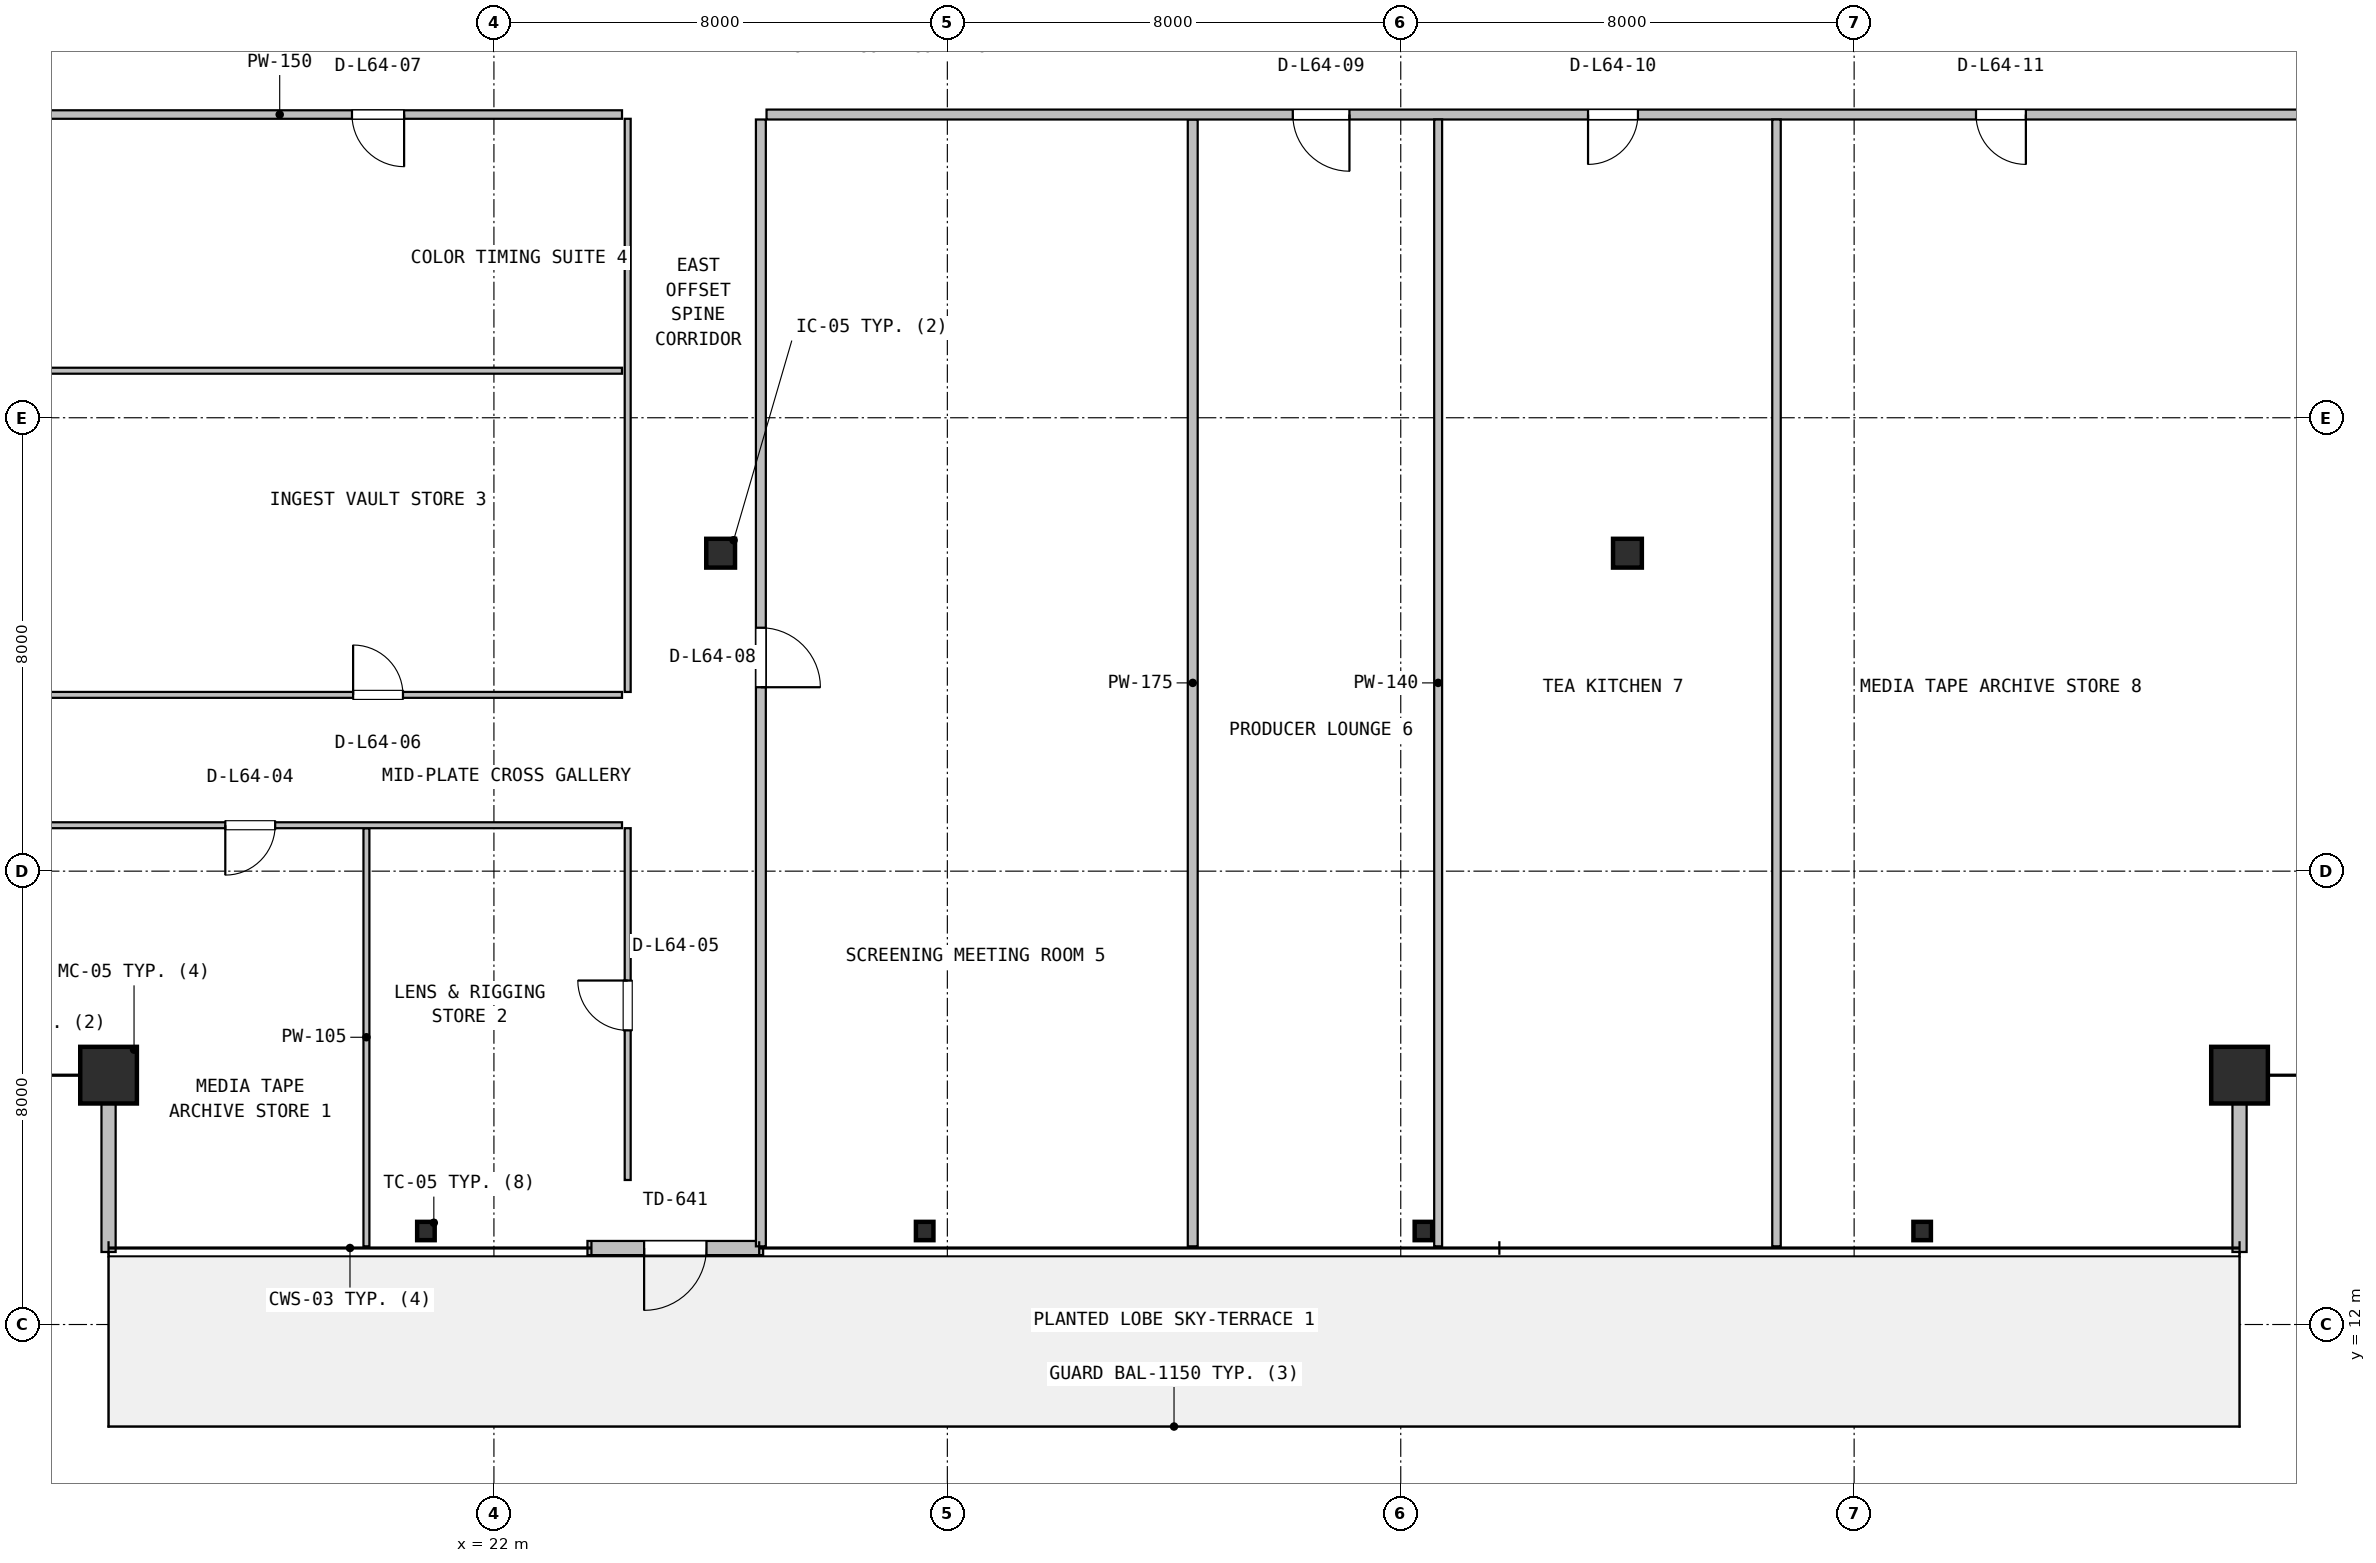
"""IFC4 building model, lengths in metres.
Left out: names, types, materials, properties, quantities, classifications, styles, units other than length and angle.
Written with IfcOpenShell. Run it as: python <this file> out.ifc"""

import sys

from ifc_helpers import new_model, si_unit, direction, frame, frame_2d, origin, origin_2d, place, context, subcontext, project, spatial, rectangle, hollow_rectangle, hollow_circle, i_section, extrude, source, transform, mapped, element, fill, save


model = new_model("IFC4")
c1 = context("Model", 3, precision=1e-05, world=origin(), true_north=direction((0.0, 1.0)))
c2 = subcontext(c1, "Body", "Model", "MODEL_VIEW")
j1 = project(units=[si_unit("LENGTHUNIT", "METRE"), si_unit("PLANEANGLEUNIT", "RADIAN")], contexts=[c1])
p1 = place(None, origin())
s1 = spatial("IfcSite", under=j1, at=p1, CompositionType="ELEMENT")
p2 = place(p1, origin())
s2 = spatial("IfcBuilding", under=s1, at=p2, CompositionType="ELEMENT")
p3 = place(p2, frame((0.0, 0.0, 258.4)))
s3 = spatial("IfcBuildingStorey", under=s2, at=p3, CompositionType="ELEMENT", Elevation=258.4)
m1 = source(origin(), c2, "Body", "SweptSolid", [
    extrude(hollow_rectangle(XDim=1.0, YDim=1.0, WallThickness=0.04, at=origin_2d()), origin(), (0.0, 0.0, 1.0), 3.8),
])
for number, where, z_axis, x_axis in (
    (1, (15.2, 16.4, 0.0), (0.0, 0.0, 1.0), (1.0, 0.0, 0.0)),
    (2, (52.8, 16.4, 0.0), (0.0, 0.0, 1.0), (1.0, 0.0, 0.0)),
):
    element("IfcColumn", number, at=place(p3, frame(where, z_axis=z_axis, x_axis=x_axis)), inside=s3, PredefinedType="COLUMN", context=c2, shape_type="MappedRepresentation", body=[
        mapped(m1, transform((0.0, 0.0, 0.0), x_axis=(1.0, 0.0, 0.0), y_axis=(0.0, 1.0, 0.0), z_axis=(0.0, 0.0, 1.0), scale=1.0)),
    ])
m2 = source(origin(), c2, "Body", "SweptSolid", [
    extrude(i_section(OverallWidth=0.309, OverallDepth=0.323, WebThickness=0.014, FlangeThickness=0.023, FilletRadius=0.015, at=origin_2d()), origin(), (0.0, 0.0, 1.0), 3.8),
])
for number, where, z_axis, x_axis in (
    (3, (20.8, 13.65, 0.0), (0.0, 0.0, 1.0), (1.0, 0.0, 0.0)),
    (4, (29.6, 13.65, 0.0), (0.0, 0.0, 1.0), (1.0, 0.0, 0.0)),
    (5, (38.4, 13.65, 0.0), (0.0, 0.0, 1.0), (1.0, 0.0, 0.0)),
    (6, (47.2, 13.65, 0.0), (0.0, 0.0, 1.0), (1.0, 0.0, 0.0)),
):
    element("IfcColumn", number, at=place(p3, frame(where, z_axis=z_axis, x_axis=x_axis)), inside=s3, PredefinedType="COLUMN", context=c2, shape_type="MappedRepresentation", body=[
        mapped(m2, transform((0.0, 0.0, 0.0), x_axis=(1.0, 0.0, 0.0), y_axis=(0.0, 1.0, 0.0), z_axis=(0.0, 0.0, 1.0), scale=1.0)),
    ])
m3 = source(origin(), c2, "Body", "SweptSolid", [
    extrude(hollow_circle(Radius=0.254, WallThickness=0.02, at=origin_2d()), origin(), (0.0, 0.0, 1.0), 3.8),
])
for number, where, z_axis, x_axis in (
    (7, (26.0, 25.61, 0.0), (0.0, 0.0, 1.0), (1.0, 0.0, 0.0)),
    (8, (42.0, 25.61, 0.0), (0.0, 0.0, 1.0), (1.0, 0.0, 0.0)),
):
    element("IfcColumn", number, at=place(p3, frame(where, z_axis=z_axis, x_axis=x_axis)), inside=s3, PredefinedType="COLUMN", context=c2, shape_type="MappedRepresentation", body=[
        mapped(m3, transform((0.0, 0.0, 0.0), x_axis=(1.0, 0.0, 0.0), y_axis=(0.0, 1.0, 0.0), z_axis=(0.0, 0.0, 1.0), scale=1.0)),
    ])
p4 = place(p3, frame((23.65, 13.35, 0.0), z_axis=(0.0, 0.0, 1.0), x_axis=(1.0, 0.0, 0.0)))
e9 = element("IfcWall", 9, at=p4, inside=s3, PredefinedType="SOLIDWALL", context=c2, shape_type="SweptSolid", body=[
    extrude(rectangle(XDim=3.1, YDim=0.25, at=frame_2d((1.55, 0.0))), origin(), (0.0, 0.0, 1.0), 3.53),
])
p5 = place(p4, frame((1.0, 0.0, 0.0)))
e10 = element("IfcOpeningElement", 10, at=p5, cuts=e9, PredefinedType="OPENING", context=c2, shape_type="SweptSolid", body=[
    extrude(rectangle(XDim=1.1, YDim=2.15, at=frame_2d((0.55, 1.075))), frame((0.0, 0.135, 0.0), z_axis=(0.0, -1.0, 0.0), x_axis=(1.0, 0.0, 0.0)), (0.0, 0.0, 1.0), 0.27),
])
for number, where, z_axis, x_axis in (
    (11, (15.2, 13.28, 0.0), (0.0, 0.0, 1.0), (0.0, 1.0, 0.0)),
    (12, (52.8, 13.28, 0.0), (0.0, 0.0, 1.0), (0.0, 1.0, 0.0)),
):
    element("IfcWall", number, at=place(p3, frame(where, z_axis=z_axis, x_axis=x_axis)), inside=s3, PredefinedType="SOLIDWALL", context=c2, shape_type="SweptSolid", body=[
        extrude(rectangle(XDim=3.2, YDim=0.25, at=frame_2d((1.6, 0.0))), origin(), (0.0, 0.0, 1.0), 3.171),
    ])
p6 = place(p3, frame((19.75, 13.38, 0.0), z_axis=(0.0, 0.0, 1.0), x_axis=(0.0, 1.0, 0.0)))
e13 = element("IfcWall", 13, at=p6, inside=s3, PredefinedType="PARTITIONING", context=c2, shape_type="SweptSolid", body=[
    extrude(rectangle(XDim=7.378, YDim=0.105, at=frame_2d((3.689, 0.0))), origin(), (0.0, 0.0, 1.0), 3.171),
])
p7 = place(p3, frame((12.18, 20.81, 0.0), z_axis=(0.0, 0.0, 1.0), x_axis=(1.0, 0.0, 0.0)))
e14 = element("IfcWall", 14, at=p7, inside=s3, PredefinedType="PARTITIONING", context=c2, shape_type="SweptSolid", body=[
    extrude(rectangle(XDim=12.08, YDim=0.105, at=frame_2d((6.04, 0.0))), origin(), (0.0, 0.0, 1.0), 3.171),
])
p8 = place(p7, frame((5.08, 0.0, 0.0)))
e15 = element("IfcOpeningElement", 15, at=p8, cuts=e14, PredefinedType="OPENING", context=c2, shape_type="SweptSolid", body=[
    extrude(rectangle(XDim=0.88, YDim=2.06, at=frame_2d((0.44, 1.03))), frame((0.0, 0.062, 0.0), z_axis=(0.0, -1.0, 0.0), x_axis=(1.0, 0.0, 0.0)), (0.0, 0.0, 1.0), 0.125),
])
p9 = place(p3, frame((24.36, 14.55, 0.0), z_axis=(0.0, 0.0, 1.0), x_axis=(0.0, 1.0, 0.0)))
e16 = element("IfcWall", 16, at=p9, inside=s3, PredefinedType="PARTITIONING", context=c2, shape_type="SweptSolid", body=[
    extrude(rectangle(XDim=6.208, YDim=0.105, at=frame_2d((3.104, 0.0))), origin(), (0.0, 0.0, 1.0), 3.278),
])
p10 = place(p9, frame((2.64, 0.0, 0.0)))
e17 = element("IfcOpeningElement", 17, at=p10, cuts=e16, PredefinedType="OPENING", context=c2, shape_type="SweptSolid", body=[
    extrude(rectangle(XDim=0.88, YDim=2.06, at=frame_2d((0.44, 1.03))), frame((0.0, 0.062, 0.0), z_axis=(0.0, -1.0, 0.0), x_axis=(1.0, 0.0, 0.0)), (0.0, 0.0, 1.0), 0.125),
])
p11 = place(p3, frame((12.18, 23.11, 0.0), z_axis=(0.0, 0.0, 1.0), x_axis=(1.0, 0.0, 0.0)))
e18 = element("IfcWall", 18, at=p11, inside=s3, PredefinedType="PARTITIONING", context=c2, shape_type="SweptSolid", body=[
    extrude(rectangle(XDim=12.08, YDim=0.105, at=frame_2d((6.04, 0.0))), origin(), (0.0, 0.0, 1.0), 3.171),
])
p12 = place(p11, frame((7.335, 0.0, 0.0)))
e19 = element("IfcOpeningElement", 19, at=p12, cuts=e18, PredefinedType="OPENING", context=c2, shape_type="SweptSolid", body=[
    extrude(rectangle(XDim=0.88, YDim=2.06, at=frame_2d((0.44, 1.03))), frame((0.0, 0.062, 0.0), z_axis=(0.0, -1.0, 0.0), x_axis=(1.0, 0.0, 0.0)), (0.0, 0.0, 1.0), 0.125),
])
p13 = place(p3, frame((24.36, 23.162, 0.0), z_axis=(0.0, 0.0, 1.0), x_axis=(0.0, 1.0, 0.0)))
e20 = element("IfcWall", 20, at=p13, inside=s3, PredefinedType="PARTITIONING", context=c2, shape_type="SweptSolid", body=[
    extrude(rectangle(XDim=10.113, YDim=0.105, at=frame_2d((5.056, 0.0))), origin(), (0.0, 0.0, 1.0), 3.278),
])
p14 = place(p3, frame((12.18, 28.83, 0.0), z_axis=(0.0, 0.0, 1.0), x_axis=(1.0, 0.0, 0.0)))
e21 = element("IfcWall", 21, at=p14, inside=s3, PredefinedType="PARTITIONING", context=c2, shape_type="SweptSolid", body=[
    extrude(rectangle(XDim=12.08, YDim=0.105, at=frame_2d((6.04, 0.0))), origin(), (0.0, 0.0, 1.0), 3.171),
])
p15 = place(p3, frame((12.18, 33.35, 0.0), z_axis=(0.0, 0.0, 1.0), x_axis=(1.0, 0.0, 0.0)))
e22 = element("IfcWall", 22, at=p15, inside=s3, PredefinedType="PARTITIONING", context=c2, shape_type="SweptSolid", body=[
    extrude(rectangle(XDim=12.08, YDim=0.15, at=frame_2d((6.04, 0.0))), origin(), (0.0, 0.0, 1.0), 3.171),
])
p16 = place(p15, frame((7.315, 0.0, 0.0)))
e23 = element("IfcOpeningElement", 23, at=p16, cuts=e22, PredefinedType="OPENING", context=c2, shape_type="SweptSolid", body=[
    extrude(rectangle(XDim=0.92, YDim=2.08, at=frame_2d((0.46, 1.04))), frame((0.0, 0.085, 0.0), z_axis=(0.0, -1.0, 0.0), x_axis=(1.0, 0.0, 0.0)), (0.0, 0.0, 1.0), 0.17),
])
p17 = place(p3, frame((34.33, 13.38, 0.0), z_axis=(0.0, 0.0, 1.0), x_axis=(0.0, 1.0, 0.0)))
e24 = element("IfcWall", 24, at=p17, inside=s3, PredefinedType="PARTITIONING", context=c2, shape_type="SweptSolid", body=[
    extrude(rectangle(XDim=19.883, YDim=0.175, at=frame_2d((9.941, 0.0))), origin(), (0.0, 0.0, 1.0), 2.981),
])
p18 = place(p3, frame((26.81, 33.35, 0.0), z_axis=(0.0, 0.0, 1.0), x_axis=(1.0, 0.0, 0.0)))
e25 = element("IfcWall", 25, at=p18, inside=s3, PredefinedType="PARTITIONING", context=c2, shape_type="SweptSolid", body=[
    extrude(rectangle(XDim=29.01, YDim=0.175, at=frame_2d((14.505, 0.0))), origin(), (0.0, 0.0, 1.0), 2.981),
])
p19 = place(p18, frame((9.285, 0.0, 0.0)))
e26 = element("IfcOpeningElement", 26, at=p19, cuts=e25, PredefinedType="OPENING", context=c2, shape_type="SweptSolid", body=[
    extrude(rectangle(XDim=1.0, YDim=2.1, at=frame_2d((0.5, 1.05))), frame((0.0, 0.098, 0.0), z_axis=(0.0, -1.0, 0.0), x_axis=(1.0, 0.0, 0.0)), (0.0, 0.0, 1.0), 0.195),
])
p20 = place(p18, frame((14.495, 0.0, 0.0)))
e27 = element("IfcOpeningElement", 27, at=p20, cuts=e25, PredefinedType="OPENING", context=c2, shape_type="SweptSolid", body=[
    extrude(rectangle(XDim=0.88, YDim=2.06, at=frame_2d((0.44, 1.03))), frame((0.0, 0.098, 0.0), z_axis=(0.0, -1.0, 0.0), x_axis=(1.0, 0.0, 0.0)), (0.0, 0.0, 1.0), 0.195),
])
p21 = place(p18, frame((21.34, 0.0, 0.0)))
e28 = element("IfcOpeningElement", 28, at=p21, cuts=e25, PredefinedType="OPENING", context=c2, shape_type="SweptSolid", body=[
    extrude(rectangle(XDim=0.88, YDim=2.06, at=frame_2d((0.44, 1.03))), frame((0.0, 0.098, 0.0), z_axis=(0.0, -1.0, 0.0), x_axis=(1.0, 0.0, 0.0)), (0.0, 0.0, 1.0), 0.195),
])
p22 = place(p3, frame((26.71, 13.38, 0.0), z_axis=(0.0, 0.0, 1.0), x_axis=(0.0, 1.0, 0.0)))
e29 = element("IfcWall", 29, at=p22, inside=s3, PredefinedType="PARTITIONING", context=c2, shape_type="SweptSolid", body=[
    extrude(rectangle(XDim=19.883, YDim=0.175, at=frame_2d((9.941, 0.0))), origin(), (0.0, 0.0, 1.0), 2.981),
])
p23 = place(p22, frame((9.865, 0.0, 0.0)))
e30 = element("IfcOpeningElement", 30, at=p23, cuts=e29, PredefinedType="OPENING", context=c2, shape_type="SweptSolid", body=[
    extrude(rectangle(XDim=1.05, YDim=2.1, at=frame_2d((0.525, 1.05))), frame((0.0, 0.098, 0.0), z_axis=(0.0, -1.0, 0.0), x_axis=(1.0, 0.0, 0.0)), (0.0, 0.0, 1.0), 0.195),
])
p24 = place(p3, frame((38.66, 13.38, 0.0), z_axis=(0.0, 0.0, 1.0), x_axis=(0.0, 1.0, 0.0)))
e31 = element("IfcWall", 31, at=p24, inside=s3, PredefinedType="PARTITIONING", context=c2, shape_type="SweptSolid", body=[
    extrude(rectangle(XDim=19.883, YDim=0.14, at=frame_2d((9.941, 0.0))), origin(), (0.0, 0.0, 1.0), 2.981),
])
p25 = place(p3, frame((44.63, 13.38, 0.0), z_axis=(0.0, 0.0, 1.0), x_axis=(0.0, 1.0, 0.0)))
e32 = element("IfcWall", 32, at=p25, inside=s3, PredefinedType="PARTITIONING", context=c2, shape_type="SweptSolid", body=[
    extrude(rectangle(XDim=19.883, YDim=0.15, at=frame_2d((9.941, 0.0))), origin(), (0.0, 0.0, 1.0), 3.171),
])
m4 = source(origin(), c2, "Body", "SweptSolid", [
    extrude(rectangle(XDim=1.1, YDim=2.15, at=frame_2d((0.55, 1.075))), frame((0.0, 0.025, 0.0), z_axis=(0.0, -1.0, 0.0), x_axis=(1.0, 0.0, 0.0)), (0.0, 0.0, 1.0), 0.05),
])
p26 = place(p5, frame((1.1, 0.0, 0.0), z_axis=(0.0, 0.0, 1.0), x_axis=(-1.0, 0.0, 0.0)))
e33 = element("IfcDoor", 33, at=p26, inside=s3, OperationType="SINGLE_SWING_LEFT", PredefinedType="DOOR", context=c2, shape_type="MappedRepresentation", body=[
    mapped(m4, transform((0.0, 0.0, 0.0), x_axis=(1.0, 0.0, 0.0), y_axis=(0.0, 1.0, 0.0), z_axis=(0.0, 0.0, 1.0), scale=1.0)),
])
fill(e10, e33)
m5 = source(origin(), c2, "Body", "SweptSolid", [
    extrude(rectangle(XDim=0.88, YDim=2.06, at=frame_2d((0.44, 1.03))), frame((0.0, 0.025, 0.0), z_axis=(0.0, -1.0, 0.0), x_axis=(1.0, 0.0, 0.0)), (0.0, 0.0, 1.0), 0.05),
])
p27 = place(p8, frame((0.88, 0.0, 0.0), z_axis=(0.0, 0.0, 1.0), x_axis=(-1.0, 0.0, 0.0)))
e34 = element("IfcDoor", 34, at=p27, inside=s3, OperationType="SINGLE_SWING_LEFT", PredefinedType="DOOR", context=c2, shape_type="MappedRepresentation", body=[
    mapped(m5, transform((0.0, 0.0, 0.0), x_axis=(1.0, 0.0, 0.0), y_axis=(0.0, 1.0, 0.0), z_axis=(0.0, 0.0, 1.0), scale=1.0)),
])
fill(e15, e34)
p28 = place(p10, origin())
e35 = element("IfcDoor", 35, at=p28, inside=s3, OperationType="SINGLE_SWING_RIGHT", PredefinedType="DOOR", context=c2, shape_type="MappedRepresentation", body=[
    mapped(m5, transform((0.0, 0.0, 0.0), x_axis=(1.0, 0.0, 0.0), y_axis=(0.0, 1.0, 0.0), z_axis=(0.0, 0.0, 1.0), scale=1.0)),
])
fill(e17, e35)
p29 = place(p12, origin())
e36 = element("IfcDoor", 36, at=p29, inside=s3, OperationType="SINGLE_SWING_LEFT", PredefinedType="DOOR", context=c2, shape_type="MappedRepresentation", body=[
    mapped(m5, transform((0.0, 0.0, 0.0), x_axis=(1.0, 0.0, 0.0), y_axis=(0.0, 1.0, 0.0), z_axis=(0.0, 0.0, 1.0), scale=1.0)),
])
fill(e19, e36)
m6 = source(origin(), c2, "Body", "SweptSolid", [
    extrude(rectangle(XDim=0.92, YDim=2.08, at=frame_2d((0.46, 1.04))), frame((0.0, 0.025, 0.0), z_axis=(0.0, -1.0, 0.0), x_axis=(1.0, 0.0, 0.0)), (0.0, 0.0, 1.0), 0.05),
])
p30 = place(p16, frame((0.92, 0.0, 0.0), z_axis=(0.0, 0.0, 1.0), x_axis=(-1.0, 0.0, 0.0)))
e37 = element("IfcDoor", 37, at=p30, inside=s3, OperationType="SINGLE_SWING_RIGHT", PredefinedType="DOOR", context=c2, shape_type="MappedRepresentation", body=[
    mapped(m6, transform((0.0, 0.0, 0.0), x_axis=(1.0, 0.0, 0.0), y_axis=(0.0, 1.0, 0.0), z_axis=(0.0, 0.0, 1.0), scale=1.0)),
])
fill(e23, e37)
m7 = source(origin(), c2, "Body", "SweptSolid", [
    extrude(rectangle(XDim=1.05, YDim=2.1, at=frame_2d((0.525, 1.05))), frame((0.0, 0.025, 0.0), z_axis=(0.0, -1.0, 0.0), x_axis=(1.0, 0.0, 0.0)), (0.0, 0.0, 1.0), 0.05),
])
p31 = place(p23, frame((1.05, 0.0, 0.0), z_axis=(0.0, 0.0, 1.0), x_axis=(-1.0, 0.0, 0.0)))
e38 = element("IfcDoor", 38, at=p31, inside=s3, OperationType="SINGLE_SWING_LEFT", PredefinedType="DOOR", context=c2, shape_type="MappedRepresentation", body=[
    mapped(m7, transform((0.0, 0.0, 0.0), x_axis=(1.0, 0.0, 0.0), y_axis=(0.0, 1.0, 0.0), z_axis=(0.0, 0.0, 1.0), scale=1.0)),
])
fill(e30, e38)
m8 = source(origin(), c2, "Body", "SweptSolid", [
    extrude(rectangle(XDim=1.0, YDim=2.1, at=frame_2d((0.5, 1.05))), frame((0.0, 0.025, 0.0), z_axis=(0.0, -1.0, 0.0), x_axis=(1.0, 0.0, 0.0)), (0.0, 0.0, 1.0), 0.05),
])
p32 = place(p19, frame((1.0, 0.0, 0.0), z_axis=(0.0, 0.0, 1.0), x_axis=(-1.0, 0.0, 0.0)))
e39 = element("IfcDoor", 39, at=p32, inside=s3, OperationType="SINGLE_SWING_RIGHT", PredefinedType="DOOR", context=c2, shape_type="MappedRepresentation", body=[
    mapped(m8, transform((0.0, 0.0, 0.0), x_axis=(1.0, 0.0, 0.0), y_axis=(0.0, 1.0, 0.0), z_axis=(0.0, 0.0, 1.0), scale=1.0)),
])
fill(e26, e39)
p33 = place(p20, frame((0.88, 0.0, 0.0), z_axis=(0.0, 0.0, 1.0), x_axis=(-1.0, 0.0, 0.0)))
e40 = element("IfcDoor", 40, at=p33, inside=s3, OperationType="SINGLE_SWING_LEFT", PredefinedType="DOOR", context=c2, shape_type="MappedRepresentation", body=[
    mapped(m5, transform((0.0, 0.0, 0.0), x_axis=(1.0, 0.0, 0.0), y_axis=(0.0, 1.0, 0.0), z_axis=(0.0, 0.0, 1.0), scale=1.0)),
])
fill(e27, e40)
p34 = place(p21, frame((0.88, 0.0, 0.0), z_axis=(0.0, 0.0, 1.0), x_axis=(-1.0, 0.0, 0.0)))
e41 = element("IfcDoor", 41, at=p34, inside=s3, OperationType="SINGLE_SWING_RIGHT", PredefinedType="DOOR", context=c2, shape_type="MappedRepresentation", body=[
    mapped(m5, transform((0.0, 0.0, 0.0), x_axis=(1.0, 0.0, 0.0), y_axis=(0.0, 1.0, 0.0), z_axis=(0.0, 0.0, 1.0), scale=1.0)),
])
fill(e28, e41)
save(model, sys.argv[1])
